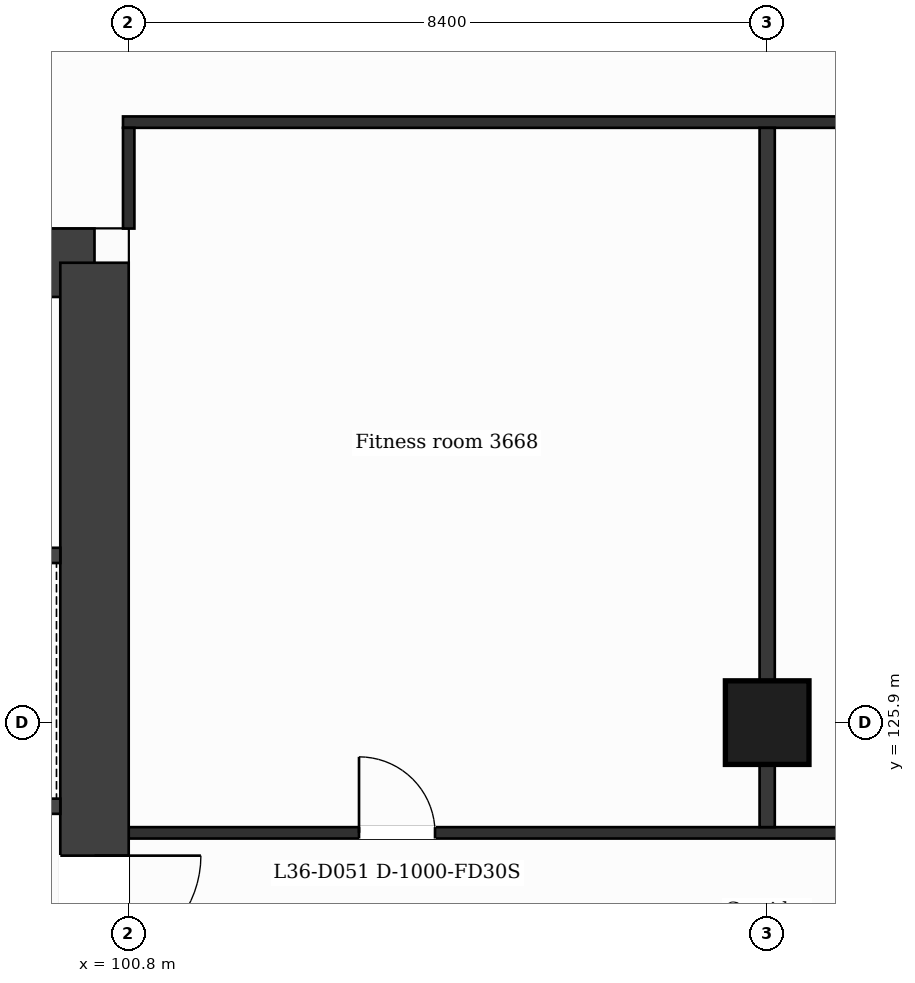
"""IFC4 building model, lengths in metres.
Left out: names, types, materials, properties, quantities, classifications, styles, units other than length and angle.
Written with IfcOpenShell. Run it as: python <this file> out.ifc"""

import sys

from ifc_helpers import new_model, si_unit, direction, frame, frame_2d, origin, origin_2d, place, context, subcontext, project, spatial, rectangle, extrude, element, fill, save


model = new_model("IFC4")
c1 = context("Model", 3, precision=1e-05, world=origin(), true_north=direction((0.0, 1.0)))
c2 = subcontext(c1, "Body", "Model", "MODEL_VIEW")
j1 = project(units=[si_unit("LENGTHUNIT", "METRE"), si_unit("PLANEANGLEUNIT", "RADIAN")], contexts=[c1])
p1 = place(None, origin())
s1 = spatial("IfcSite", under=j1, at=p1, CompositionType="ELEMENT")
p2 = place(p1, origin())
s2 = spatial("IfcBuilding", under=s1, at=p2, CompositionType="ELEMENT")
p3 = place(p2, frame((0.0, 0.0, 155.2)))
s3 = spatial("IfcBuildingStorey", under=s2, at=p3, CompositionType="ELEMENT", Elevation=155.2)
p4 = place(p3, frame((89.024, 131.95, 0.0), z_axis=(0.0, 0.0, 1.0), x_axis=(1.0, 0.0, 0.0)))
e1 = element("IfcWall", 1, at=p4, inside=s3, PredefinedType="SHEAR", context=c2, shape_type="SweptSolid", body=[
    extrude(rectangle(XDim=11.326, YDim=0.9, at=frame_2d((5.663, 0.0))), origin(), (0.0, 0.0, 1.0), 3.7),
])
p5 = place(p4, frame((6.739, 0.0, 0.0)))
e2 = element("IfcOpeningElement", 2, at=p5, cuts=e1, PredefinedType="OPENING", context=c2, shape_type="SweptSolid", body=[
    extrude(rectangle(XDim=1.2, YDim=2.1, at=frame_2d((0.6, 1.05))), frame((0.0, 0.46, 0.0), z_axis=(0.0, -1.0, 0.0), x_axis=(1.0, 0.0, 0.0)), (0.0, 0.0, 1.0), 0.92),
])
p6 = place(p3, frame((100.35, 131.95, 0.0), z_axis=(0.0, 0.0, 1.0), x_axis=(0.0, -1.0, 0.0)))
e3 = element("IfcWall", 3, at=p6, inside=s3, PredefinedType="SHEAR", context=c2, shape_type="SweptSolid", body=[
    extrude(rectangle(XDim=21.1, YDim=0.9, at=frame_2d((10.55, 0.0))), origin(), (0.0, 0.0, 1.0), 3.7),
])
p7 = place(p6, frame((7.8, 0.0, 0.0)))
e4 = element("IfcOpeningElement", 4, at=p7, cuts=e3, PredefinedType="OPENING", context=c2, shape_type="SweptSolid", body=[
    extrude(rectangle(XDim=1.4, YDim=2.1, at=frame_2d((0.7, 1.05))), frame((0.0, 0.46, 0.0), z_axis=(0.0, -1.0, 0.0), x_axis=(1.0, 0.0, 0.0)), (0.0, 0.0, 1.0), 0.92),
])
p8 = place(p3, frame((109.2, 125.9, 0.0), z_axis=(0.0, 0.0, 1.0), x_axis=(1.0, 0.0, 0.0)))
e5 = element("IfcColumn", 5, at=p8, inside=s3, PredefinedType="COLUMN", context=c2, shape_type="SweptSolid", body=[
    extrude(rectangle(XDim=1.1, YDim=1.1, at=origin_2d()), origin(), (0.0, 0.0, 1.0), 3.7),
])
p9 = place(p3, frame((100.8, 124.45, 0.0), z_axis=(0.0, 0.0, 1.0), x_axis=(1.0, 0.0, 0.0)))
e6 = element("IfcWall", 6, at=p9, inside=s3, PredefinedType="PARTITIONING", context=c2, shape_type="SweptSolid", body=[
    extrude(rectangle(XDim=25.2, YDim=0.15, at=frame_2d((12.6, 0.0))), origin(), (0.0, 0.0, 1.0), 3.38),
])
p10 = place(p9, frame((3.03, 0.0, 0.0)))
e7 = element("IfcOpeningElement", 7, at=p10, cuts=e6, PredefinedType="OPENING", context=c2, shape_type="SweptSolid", body=[
    extrude(rectangle(XDim=1.0, YDim=2.1, at=frame_2d((0.5, 1.05))), frame((0.0, 0.085, 0.0), z_axis=(0.0, -1.0, 0.0), x_axis=(1.0, 0.0, 0.0)), (0.0, 0.0, 1.0), 0.17),
])
p11 = place(p9, frame((12.77, 0.0, 0.0)))
e8 = element("IfcOpeningElement", 8, at=p11, cuts=e6, PredefinedType="OPENING", context=c2, shape_type="SweptSolid", body=[
    extrude(rectangle(XDim=1.0, YDim=2.1, at=frame_2d((0.5, 1.05))), frame((0.0, 0.085, 0.0), z_axis=(0.0, -1.0, 0.0), x_axis=(1.0, 0.0, 0.0)), (0.0, 0.0, 1.0), 0.17),
])
p12 = place(p9, frame((17.67, 0.0, 0.0)))
e9 = element("IfcOpeningElement", 9, at=p12, cuts=e6, PredefinedType="OPENING", context=c2, shape_type="SweptSolid", body=[
    extrude(rectangle(XDim=1.0, YDim=2.1, at=frame_2d((0.5, 1.05))), frame((0.0, 0.085, 0.0), z_axis=(0.0, -1.0, 0.0), x_axis=(1.0, 0.0, 0.0)), (0.0, 0.0, 1.0), 0.17),
])
p13 = place(p9, frame((22.35, 0.0, 0.0)))
e10 = element("IfcOpeningElement", 10, at=p13, cuts=e6, PredefinedType="OPENING", context=c2, shape_type="SweptSolid", body=[
    extrude(rectangle(XDim=1.0, YDim=2.1, at=frame_2d((0.5, 1.05))), frame((0.0, 0.085, 0.0), z_axis=(0.0, -1.0, 0.0), x_axis=(1.0, 0.0, 0.0)), (0.0, 0.0, 1.0), 0.17),
])
p14 = place(p3, frame((92.702, 124.8, 0.0), z_axis=(0.0, 0.0, 1.0), x_axis=(1.0, 0.0, 0.0)))
e11 = element("IfcWall", 11, at=p14, inside=s3, PredefinedType="PARTITIONING", context=c2, shape_type="SweptSolid", body=[
    extrude(rectangle(XDim=7.198, YDim=0.2, at=frame_2d((3.599, 0.0))), origin(), (0.0, 0.0, 1.0), 3.38),
])
p15 = place(p14, frame((5.609, 0.0, 0.0)))
e12 = element("IfcOpeningElement", 12, at=p15, cuts=e11, PredefinedType="OPENING", context=c2, shape_type="SweptSolid", body=[
    extrude(rectangle(XDim=1.1, YDim=2.1, at=frame_2d((0.55, 1.05))), frame((0.0, 0.11, 0.0), z_axis=(0.0, -1.0, 0.0), x_axis=(1.0, 0.0, 0.0)), (0.0, 0.0, 1.0), 0.22),
])
p16 = place(p3, frame((92.827, 128.1, 0.0), z_axis=(0.0, 0.0, 1.0), x_axis=(1.0, 0.0, 0.0)))
e13 = element("IfcWall", 13, at=p16, inside=s3, PredefinedType="PARTITIONING", context=c2, shape_type="SweptSolid", body=[
    extrude(rectangle(XDim=7.073, YDim=0.2, at=frame_2d((3.537, 0.0))), origin(), (0.0, 0.0, 1.0), 3.38),
])
p17 = place(p16, frame((3.042, 0.0, 0.0)))
e14 = element("IfcOpeningElement", 14, at=p17, cuts=e13, PredefinedType="OPENING", context=c2, shape_type="SweptSolid", body=[
    extrude(rectangle(XDim=1.1, YDim=2.1, at=frame_2d((0.55, 1.05))), frame((0.0, 0.11, 0.0), z_axis=(0.0, -1.0, 0.0), x_axis=(1.0, 0.0, 0.0)), (0.0, 0.0, 1.0), 0.22),
])
p18 = place(p3, frame((100.725, 133.8, 0.0), z_axis=(0.0, 0.0, 1.0), x_axis=(1.0, 0.0, 0.0)))
e15 = element("IfcWall", 15, at=p18, inside=s3, PredefinedType="PARTITIONING", context=c2, shape_type="SweptSolid", body=[
    extrude(rectangle(XDim=25.35, YDim=0.15, at=frame_2d((12.675, 0.0))), origin(), (0.0, 0.0, 1.0), 3.38),
])
p19 = place(p18, frame((17.85, 0.0, 0.0)))
e16 = element("IfcOpeningElement", 16, at=p19, cuts=e15, PredefinedType="OPENING", context=c2, shape_type="SweptSolid", body=[
    extrude(rectangle(XDim=1.0, YDim=2.1, at=frame_2d((0.5, 1.05))), frame((0.0, 0.085, 0.0), z_axis=(0.0, -1.0, 0.0), x_axis=(1.0, 0.0, 0.0)), (0.0, 0.0, 1.0), 0.17),
])
p20 = place(p3, frame((100.8, 132.4, 0.0), z_axis=(0.0, 0.0, 1.0), x_axis=(0.0, 1.0, 0.0)))
e17 = element("IfcWall", 17, at=p20, inside=s3, PredefinedType="PARTITIONING", context=c2, shape_type="SweptSolid", body=[
    extrude(rectangle(XDim=1.325, YDim=0.15, at=frame_2d((0.663, 0.0))), origin(), (0.0, 0.0, 1.0), 3.38),
])
p21 = place(p3, frame((109.2, 124.525, 0.0), z_axis=(0.0, 0.0, 1.0), x_axis=(0.0, 1.0, 0.0)))
e18 = element("IfcWall", 18, at=p21, inside=s3, PredefinedType="PARTITIONING", context=c2, shape_type="SweptSolid", body=[
    extrude(rectangle(XDim=9.2, YDim=0.2, at=frame_2d((4.6, 0.0))), origin(), (0.0, 0.0, 1.0), 3.38),
])
p22 = place(p10, origin())
e19 = element("IfcDoor", 19, at=p22, inside=s3, OperationType="SINGLE_SWING_LEFT", PredefinedType="DOOR", context=c2, shape_type="SweptSolid", body=[
    extrude(rectangle(XDim=1.0, YDim=2.1, at=frame_2d((0.5, 1.05))), frame((0.0, 0.025, 0.0), z_axis=(0.0, -1.0, 0.0), x_axis=(1.0, 0.0, 0.0)), (0.0, 0.0, 1.0), 0.05),
])
fill(e7, e19)
p23 = place(p7, origin())
e20 = element("IfcDoor", 20, at=p23, inside=s3, OperationType="SINGLE_SWING_LEFT", PredefinedType="DOOR", context=c2, shape_type="SweptSolid", body=[
    extrude(rectangle(XDim=1.4, YDim=2.1, at=frame_2d((0.7, 1.05))), frame((0.0, 0.025, 0.0), z_axis=(0.0, -1.0, 0.0), x_axis=(1.0, 0.0, 0.0)), (0.0, 0.0, 1.0), 0.05),
])
fill(e4, e20)
save(model, sys.argv[1])
